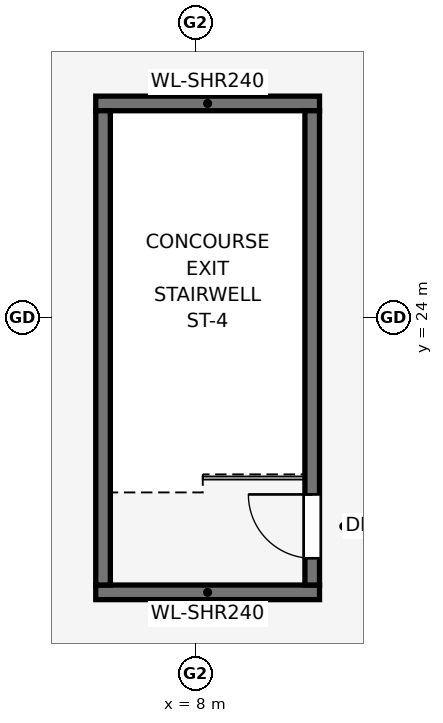
"""IFC4 building model, lengths in metres.
Left out: names, types, materials, properties, quantities, classifications, styles, units other than length and angle.
Written with IfcOpenShell. Run it as: python <this file> out.ifc"""

import sys

from ifc_helpers import new_model, si_unit, direction, frame, frame_2d, origin, place, context, subcontext, project, spatial, rectangle, extrude, element, fill, save


model = new_model("IFC4")
c1 = context("Model", 3, precision=1e-05, world=origin(), true_north=direction((0.0, 1.0)))
c2 = subcontext(c1, "Body", "Model", "MODEL_VIEW")
j1 = project(units=[si_unit("LENGTHUNIT", "METRE"), si_unit("PLANEANGLEUNIT", "RADIAN")], contexts=[c1])
p1 = place(None, origin())
s1 = spatial("IfcSite", under=j1, at=p1, CompositionType="ELEMENT")
p2 = place(p1, origin())
s2 = spatial("IfcBuilding", under=s1, at=p2, CompositionType="ELEMENT")
p3 = place(p2, frame((0.0, 0.0, 16.0)))
s3 = spatial("IfcBuildingStorey", under=s2, at=p3, CompositionType="ELEMENT", Elevation=16.0)
for number, where, z_axis, x_axis in (
    (1, (6.36, 19.48, 0.0), (0.0, 0.0, 1.0), (1.0, 0.0, 0.0)),
    (2, (10.04, 27.52, 0.0), (0.0, 0.0, 1.0), (-1.0, 0.0, 0.0)),
):
    element("IfcWall", number, at=place(p3, frame(where, z_axis=z_axis, x_axis=x_axis)), inside=s3, PredefinedType="SHEAR", context=c2, shape_type="SweptSolid", body=[
        extrude(rectangle(XDim=3.68, YDim=0.24, at=frame_2d((1.84, 0.0))), origin(), (0.0, 0.0, 1.0), 5.0),
    ])
p4 = place(p3, frame((6.48, 27.4, 0.0), z_axis=(0.0, 0.0, 1.0), x_axis=(0.0, -1.0, 0.0)))
e3 = element("IfcWall", 3, at=p4, inside=s3, PredefinedType="SHEAR", context=c2, shape_type="SweptSolid", body=[
    extrude(rectangle(XDim=7.8, YDim=0.24, at=frame_2d((3.9, 0.0))), origin(), (0.0, 0.0, 1.0), 5.0),
])
p5 = place(p3, frame((9.92, 19.6, 0.0), z_axis=(0.0, 0.0, 1.0), x_axis=(0.0, 1.0, 0.0)))
e4 = element("IfcWall", 4, at=p5, inside=s3, PredefinedType="SHEAR", context=c2, shape_type="SweptSolid", body=[
    extrude(rectangle(XDim=7.8, YDim=0.24, at=frame_2d((3.9, 0.0))), origin(), (0.0, 0.0, 1.0), 5.0),
])
p6 = place(p5, frame((0.44, 0.0, 0.0)))
e5 = element("IfcOpeningElement", 5, at=p6, cuts=e4, PredefinedType="OPENING", context=c2, shape_type="SweptSolid", body=[
    extrude(rectangle(XDim=1.05, YDim=2.0, at=frame_2d((0.525, 1.0))), frame((0.0, 0.13, 0.0), z_axis=(0.0, -1.0, 0.0), x_axis=(1.0, 0.0, 0.0)), (0.0, 0.0, 1.0), 0.26),
])
p7 = place(p6, origin())
e6 = element("IfcDoor", 6, at=p7, inside=s3, OperationType="SINGLE_SWING_RIGHT", PredefinedType="DOOR", context=c2, shape_type="SweptSolid", body=[
    extrude(rectangle(XDim=1.05, YDim=2.0, at=frame_2d((0.525, 1.0))), frame((0.0, 0.025, 0.0), z_axis=(0.0, -1.0, 0.0), x_axis=(1.0, 0.0, 0.0)), (0.0, 0.0, 1.0), 0.05),
])
fill(e5, e6)
save(model, sys.argv[1])
